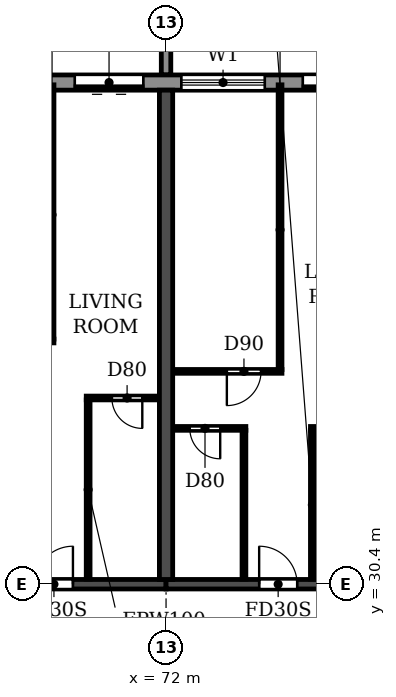
"""IFC4 building model, lengths in metres.
Left out: names, types, materials, properties, quantities, classifications, styles, units other than length and angle.
Written with IfcOpenShell. Run it as: python <this file> out.ifc"""

import sys

from ifc_helpers import new_model, si_unit, direction, frame, frame_2d, origin, place, context, subcontext, project, spatial, polyline, rectangle, outline, extrude, source, transform, mapped, element, fill, save


model = new_model("IFC4")
c1 = context("Model", 3, precision=1e-05, world=origin(), true_north=direction((0.0, 1.0)))
c2 = subcontext(c1, "Body", "Model", "MODEL_VIEW")
j1 = project(units=[si_unit("LENGTHUNIT", "METRE"), si_unit("PLANEANGLEUNIT", "RADIAN")], contexts=[c1])
p1 = place(None, origin())
s1 = spatial("IfcSite", under=j1, at=p1, CompositionType="ELEMENT")
p2 = place(p1, origin())
s2 = spatial("IfcBuilding", under=s1, at=p2, CompositionType="ELEMENT")
p3 = place(p2, frame((0.0, 0.0, 92.7)))
s3 = spatial("IfcBuildingStorey", under=s2, at=p3, CompositionType="ELEMENT", Elevation=92.7)
p4 = place(p3, frame((72.0, 30.525, 0.0), z_axis=(0.0, 0.0, 1.0), x_axis=(0.0, 1.0, 0.0)))
e1 = element("IfcWall", 1, at=p4, inside=s3, PredefinedType="SHEAR", context=c2, shape_type="SweptSolid", body=[
    extrude(rectangle(XDim=12.875, YDim=0.35, at=frame_2d((6.438, 0.0))), origin(), (0.0, 0.0, 1.0), 3.06),
])
p5 = place(p3, frame((66.0, 30.4, 0.0), z_axis=(0.0, 0.0, 1.0), x_axis=(1.0, 0.0, 0.0)))
e2 = element("IfcWall", 2, at=p5, inside=s3, PredefinedType="SHEAR", context=c2, shape_type="SweptSolid", body=[
    extrude(rectangle(XDim=6.0, YDim=0.25, at=frame_2d((3.0, 0.0))), origin(), (0.0, 0.0, 1.0), 2.46),
])
p6 = place(p5, frame((2.55, 0.0, 0.0)))
e3 = element("IfcOpeningElement", 3, at=p6, cuts=e2, PredefinedType="OPENING", context=c2, shape_type="SweptSolid", body=[
    extrude(rectangle(XDim=1.0, YDim=2.1, at=frame_2d((0.5, 1.05))), frame((0.0, 0.135, 0.0), z_axis=(0.0, -1.0, 0.0), x_axis=(1.0, 0.0, 0.0)), (0.0, 0.0, 1.0), 0.27),
])
p7 = place(p3, frame((72.0, 30.4, 0.0), z_axis=(0.0, 0.0, 1.0), x_axis=(1.0, 0.0, 0.0)))
e4 = element("IfcWall", 4, at=p7, inside=s3, PredefinedType="SHEAR", context=c2, shape_type="SweptSolid", body=[
    extrude(rectangle(XDim=6.0, YDim=0.25, at=frame_2d((3.0, 0.0))), origin(), (0.0, 0.0, 1.0), 2.46),
])
p8 = place(p7, frame((2.45, 0.0, 0.0)))
e5 = element("IfcOpeningElement", 5, at=p8, cuts=e4, PredefinedType="OPENING", context=c2, shape_type="SweptSolid", body=[
    extrude(rectangle(XDim=1.0, YDim=2.1, at=frame_2d((0.5, 1.05))), frame((0.0, 0.135, 0.0), z_axis=(0.0, -1.0, 0.0), x_axis=(1.0, 0.0, 0.0)), (0.0, 0.0, 1.0), 0.27),
])
p9 = place(p3, frame((91.317, 43.6, 0.0), z_axis=(0.0, 0.0, 1.0), x_axis=(-1.0, 0.0, 0.0)))
e6 = element("IfcWall", 6, at=p9, inside=s3, PredefinedType="STANDARD", context=c2, shape_type="SweptSolid", body=[
    extrude(rectangle(XDim=80.634, YDim=0.4, at=frame_2d((40.317, 0.0))), origin(), (0.0, 0.0, 1.0), 3.06),
])
p10 = place(p9, frame((76.717, 0.0, 0.9)))
e7 = element("IfcOpeningElement", 7, at=p10, cuts=e6, PredefinedType="OPENING", context=c2, shape_type="SweptSolid", body=[
    extrude(rectangle(XDim=2.2, YDim=1.5, at=frame_2d((1.1, 0.75))), frame((0.0, 0.21, 0.0), z_axis=(0.0, -1.0, 0.0), x_axis=(1.0, 0.0, 0.0)), (0.0, 0.0, 1.0), 0.42),
])
p11 = place(p9, frame((73.917, 0.0, 0.0)))
e8 = element("IfcOpeningElement", 8, at=p11, cuts=e6, PredefinedType="OPENING", context=c2, shape_type="SweptSolid", body=[
    extrude(rectangle(XDim=1.8, YDim=2.4, at=frame_2d((0.9, 1.2))), frame((0.0, 0.21, 0.0), z_axis=(0.0, -1.0, 0.0), x_axis=(1.0, 0.0, 0.0)), (0.0, 0.0, 1.0), 0.42),
])
p12 = place(p9, frame((70.717, 0.0, 0.9)))
e9 = element("IfcOpeningElement", 9, at=p12, cuts=e6, PredefinedType="OPENING", context=c2, shape_type="SweptSolid", body=[
    extrude(rectangle(XDim=2.2, YDim=1.5, at=frame_2d((1.1, 0.75))), frame((0.0, 0.21, 0.0), z_axis=(0.0, -1.0, 0.0), x_axis=(1.0, 0.0, 0.0)), (0.0, 0.0, 1.0), 0.42),
])
p13 = place(p9, frame((67.717, 0.0, 0.9)))
e10 = element("IfcOpeningElement", 10, at=p13, cuts=e6, PredefinedType="OPENING", context=c2, shape_type="SweptSolid", body=[
    extrude(rectangle(XDim=2.2, YDim=1.5, at=frame_2d((1.1, 0.75))), frame((0.0, 0.21, 0.0), z_axis=(0.0, -1.0, 0.0), x_axis=(1.0, 0.0, 0.0)), (0.0, 0.0, 1.0), 0.42),
])
p14 = place(p9, frame((64.717, 0.0, 0.9)))
e11 = element("IfcOpeningElement", 11, at=p14, cuts=e6, PredefinedType="OPENING", context=c2, shape_type="SweptSolid", body=[
    extrude(rectangle(XDim=2.2, YDim=1.5, at=frame_2d((1.1, 0.75))), frame((0.0, 0.21, 0.0), z_axis=(0.0, -1.0, 0.0), x_axis=(1.0, 0.0, 0.0)), (0.0, 0.0, 1.0), 0.42),
])
p15 = place(p9, frame((61.917, 0.0, 0.0)))
e12 = element("IfcOpeningElement", 12, at=p15, cuts=e6, PredefinedType="OPENING", context=c2, shape_type="SweptSolid", body=[
    extrude(rectangle(XDim=1.8, YDim=2.4, at=frame_2d((0.9, 1.2))), frame((0.0, 0.21, 0.0), z_axis=(0.0, -1.0, 0.0), x_axis=(1.0, 0.0, 0.0)), (0.0, 0.0, 1.0), 0.42),
])
p16 = place(p9, frame((58.717, 0.0, 0.9)))
e13 = element("IfcOpeningElement", 13, at=p16, cuts=e6, PredefinedType="OPENING", context=c2, shape_type="SweptSolid", body=[
    extrude(rectangle(XDim=2.2, YDim=1.5, at=frame_2d((1.1, 0.75))), frame((0.0, 0.21, 0.0), z_axis=(0.0, -1.0, 0.0), x_axis=(1.0, 0.0, 0.0)), (0.0, 0.0, 1.0), 0.42),
])
p17 = place(p9, frame((55.717, 0.0, 0.9)))
e14 = element("IfcOpeningElement", 14, at=p17, cuts=e6, PredefinedType="OPENING", context=c2, shape_type="SweptSolid", body=[
    extrude(rectangle(XDim=2.2, YDim=1.5, at=frame_2d((1.1, 0.75))), frame((0.0, 0.21, 0.0), z_axis=(0.0, -1.0, 0.0), x_axis=(1.0, 0.0, 0.0)), (0.0, 0.0, 1.0), 0.42),
])
p18 = place(p9, frame((52.917, 0.0, 0.0)))
e15 = element("IfcOpeningElement", 15, at=p18, cuts=e6, PredefinedType="OPENING", context=c2, shape_type="SweptSolid", body=[
    extrude(rectangle(XDim=1.8, YDim=2.4, at=frame_2d((0.9, 1.2))), frame((0.0, 0.21, 0.0), z_axis=(0.0, -1.0, 0.0), x_axis=(1.0, 0.0, 0.0)), (0.0, 0.0, 1.0), 0.42),
])
p19 = place(p9, frame((49.717, 0.0, 0.9)))
e16 = element("IfcOpeningElement", 16, at=p19, cuts=e6, PredefinedType="OPENING", context=c2, shape_type="SweptSolid", body=[
    extrude(rectangle(XDim=2.2, YDim=1.5, at=frame_2d((1.1, 0.75))), frame((0.0, 0.21, 0.0), z_axis=(0.0, -1.0, 0.0), x_axis=(1.0, 0.0, 0.0)), (0.0, 0.0, 1.0), 0.42),
])
p20 = place(p9, frame((46.717, 0.0, 0.9)))
e17 = element("IfcOpeningElement", 17, at=p20, cuts=e6, PredefinedType="OPENING", context=c2, shape_type="SweptSolid", body=[
    extrude(rectangle(XDim=2.2, YDim=1.5, at=frame_2d((1.1, 0.75))), frame((0.0, 0.21, 0.0), z_axis=(0.0, -1.0, 0.0), x_axis=(1.0, 0.0, 0.0)), (0.0, 0.0, 1.0), 0.42),
])
p21 = place(p9, frame((43.717, 0.0, 0.9)))
e18 = element("IfcOpeningElement", 18, at=p21, cuts=e6, PredefinedType="OPENING", context=c2, shape_type="SweptSolid", body=[
    extrude(rectangle(XDim=2.2, YDim=1.5, at=frame_2d((1.1, 0.75))), frame((0.0, 0.21, 0.0), z_axis=(0.0, -1.0, 0.0), x_axis=(1.0, 0.0, 0.0)), (0.0, 0.0, 1.0), 0.42),
])
p22 = place(p9, frame((40.717, 0.0, 0.9)))
e19 = element("IfcOpeningElement", 19, at=p22, cuts=e6, PredefinedType="OPENING", context=c2, shape_type="SweptSolid", body=[
    extrude(rectangle(XDim=2.2, YDim=1.5, at=frame_2d((1.1, 0.75))), frame((0.0, 0.21, 0.0), z_axis=(0.0, -1.0, 0.0), x_axis=(1.0, 0.0, 0.0)), (0.0, 0.0, 1.0), 0.42),
])
p23 = place(p9, frame((37.917, 0.0, 0.0)))
e20 = element("IfcOpeningElement", 20, at=p23, cuts=e6, PredefinedType="OPENING", context=c2, shape_type="SweptSolid", body=[
    extrude(rectangle(XDim=1.8, YDim=2.4, at=frame_2d((0.9, 1.2))), frame((0.0, 0.21, 0.0), z_axis=(0.0, -1.0, 0.0), x_axis=(1.0, 0.0, 0.0)), (0.0, 0.0, 1.0), 0.42),
])
p24 = place(p9, frame((34.917, 0.0, 0.0)))
e21 = element("IfcOpeningElement", 21, at=p24, cuts=e6, PredefinedType="OPENING", context=c2, shape_type="SweptSolid", body=[
    extrude(rectangle(XDim=1.8, YDim=2.4, at=frame_2d((0.9, 1.2))), frame((0.0, 0.21, 0.0), z_axis=(0.0, -1.0, 0.0), x_axis=(1.0, 0.0, 0.0)), (0.0, 0.0, 1.0), 0.42),
])
p25 = place(p9, frame((31.717, 0.0, 0.9)))
e22 = element("IfcOpeningElement", 22, at=p25, cuts=e6, PredefinedType="OPENING", context=c2, shape_type="SweptSolid", body=[
    extrude(rectangle(XDim=2.2, YDim=1.5, at=frame_2d((1.1, 0.75))), frame((0.0, 0.21, 0.0), z_axis=(0.0, -1.0, 0.0), x_axis=(1.0, 0.0, 0.0)), (0.0, 0.0, 1.0), 0.42),
])
p26 = place(p9, frame((28.717, 0.0, 0.9)))
e23 = element("IfcOpeningElement", 23, at=p26, cuts=e6, PredefinedType="OPENING", context=c2, shape_type="SweptSolid", body=[
    extrude(rectangle(XDim=2.2, YDim=1.5, at=frame_2d((1.1, 0.75))), frame((0.0, 0.21, 0.0), z_axis=(0.0, -1.0, 0.0), x_axis=(1.0, 0.0, 0.0)), (0.0, 0.0, 1.0), 0.42),
])
p27 = place(p9, frame((25.717, 0.0, 0.9)))
e24 = element("IfcOpeningElement", 24, at=p27, cuts=e6, PredefinedType="OPENING", context=c2, shape_type="SweptSolid", body=[
    extrude(rectangle(XDim=2.2, YDim=1.5, at=frame_2d((1.1, 0.75))), frame((0.0, 0.21, 0.0), z_axis=(0.0, -1.0, 0.0), x_axis=(1.0, 0.0, 0.0)), (0.0, 0.0, 1.0), 0.42),
])
p28 = place(p9, frame((22.717, 0.0, 0.9)))
e25 = element("IfcOpeningElement", 25, at=p28, cuts=e6, PredefinedType="OPENING", context=c2, shape_type="SweptSolid", body=[
    extrude(rectangle(XDim=2.2, YDim=1.5, at=frame_2d((1.1, 0.75))), frame((0.0, 0.21, 0.0), z_axis=(0.0, -1.0, 0.0), x_axis=(1.0, 0.0, 0.0)), (0.0, 0.0, 1.0), 0.42),
])
p29 = place(p9, frame((19.917, 0.0, 0.0)))
e26 = element("IfcOpeningElement", 26, at=p29, cuts=e6, PredefinedType="OPENING", context=c2, shape_type="SweptSolid", body=[
    extrude(rectangle(XDim=1.8, YDim=2.4, at=frame_2d((0.9, 1.2))), frame((0.0, 0.21, 0.0), z_axis=(0.0, -1.0, 0.0), x_axis=(1.0, 0.0, 0.0)), (0.0, 0.0, 1.0), 0.42),
])
p30 = place(p9, frame((16.717, 0.0, 0.9)))
e27 = element("IfcOpeningElement", 27, at=p30, cuts=e6, PredefinedType="OPENING", context=c2, shape_type="SweptSolid", body=[
    extrude(rectangle(XDim=2.2, YDim=1.5, at=frame_2d((1.1, 0.75))), frame((0.0, 0.21, 0.0), z_axis=(0.0, -1.0, 0.0), x_axis=(1.0, 0.0, 0.0)), (0.0, 0.0, 1.0), 0.42),
])
p31 = place(p9, frame((13.917, 0.0, 0.0)))
e28 = element("IfcOpeningElement", 28, at=p31, cuts=e6, PredefinedType="OPENING", context=c2, shape_type="SweptSolid", body=[
    extrude(rectangle(XDim=1.8, YDim=2.4, at=frame_2d((0.9, 1.2))), frame((0.0, 0.21, 0.0), z_axis=(0.0, -1.0, 0.0), x_axis=(1.0, 0.0, 0.0)), (0.0, 0.0, 1.0), 0.42),
])
p32 = place(p9, frame((10.717, 0.0, 0.9)))
e29 = element("IfcOpeningElement", 29, at=p32, cuts=e6, PredefinedType="OPENING", context=c2, shape_type="SweptSolid", body=[
    extrude(rectangle(XDim=2.2, YDim=1.5, at=frame_2d((1.1, 0.75))), frame((0.0, 0.21, 0.0), z_axis=(0.0, -1.0, 0.0), x_axis=(1.0, 0.0, 0.0)), (0.0, 0.0, 1.0), 0.42),
])
p33 = place(p9, frame((7.917, 0.0, 0.0)))
e30 = element("IfcOpeningElement", 30, at=p33, cuts=e6, PredefinedType="OPENING", context=c2, shape_type="SweptSolid", body=[
    extrude(rectangle(XDim=1.8, YDim=2.4, at=frame_2d((0.9, 1.2))), frame((0.0, 0.21, 0.0), z_axis=(0.0, -1.0, 0.0), x_axis=(1.0, 0.0, 0.0)), (0.0, 0.0, 1.0), 0.42),
])
p34 = place(p9, frame((4.717, 0.0, 0.9)))
e31 = element("IfcOpeningElement", 31, at=p34, cuts=e6, PredefinedType="OPENING", context=c2, shape_type="SweptSolid", body=[
    extrude(rectangle(XDim=2.2, YDim=1.5, at=frame_2d((1.1, 0.75))), frame((0.0, 0.21, 0.0), z_axis=(0.0, -1.0, 0.0), x_axis=(1.0, 0.0, 0.0)), (0.0, 0.0, 1.0), 0.42),
])
p35 = place(p9, frame((1.917, 0.0, 0.0)))
e32 = element("IfcOpeningElement", 32, at=p35, cuts=e6, PredefinedType="OPENING", context=c2, shape_type="SweptSolid", body=[
    extrude(rectangle(XDim=1.8, YDim=2.4, at=frame_2d((0.9, 1.2))), frame((0.0, 0.21, 0.0), z_axis=(0.0, -1.0, 0.0), x_axis=(1.0, 0.0, 0.0)), (0.0, 0.0, 1.0), 0.42),
])
m1 = source(origin(), c2, "Body", "SweptSolid", [
    extrude(outline(polyline([(0.0, 0.0), (0.25, 0.0), (0.25, 3.1), (0.0, 3.1), (0.0, 0.0)])), origin(), (0.0, 0.0, 1.0), 3.1),
])
p36 = place(p3, frame((71.875, 43.8, 0.0)))
e33 = element("IfcWall", 33, at=p36, inside=s3, PredefinedType="STANDARD", context=c2, shape_type="MappedRepresentation", body=[
    mapped(m1, transform((0.0, 0.0, 0.0))),
])
p37 = place(p3, frame((72.185, 34.5, 0.0), z_axis=(0.0, 0.0, 1.0), x_axis=(1.0, 0.0, 0.0)))
e34 = element("IfcWall", 34, at=p37, inside=s3, PredefinedType="PARTITIONING", context=c2, shape_type="SweptSolid", body=[
    extrude(rectangle(XDim=1.915, YDim=0.1, at=frame_2d((0.958, 0.0))), origin(), (0.0, 0.0, 1.0), 3.06),
])
p38 = place(p37, frame((0.44, 0.0, 0.0)))
e35 = element("IfcOpeningElement", 35, at=p38, cuts=e34, PredefinedType="OPENING", context=c2, shape_type="SweptSolid", body=[
    extrude(rectangle(XDim=0.8, YDim=2.1, at=frame_2d((0.4, 1.05))), frame((0.0, 0.06, 0.0), z_axis=(0.0, -1.0, 0.0), x_axis=(1.0, 0.0, 0.0)), (0.0, 0.0, 1.0), 0.12),
])
p39 = place(p3, frame((75.8, 34.5, 0.0), z_axis=(0.0, 0.0, 1.0), x_axis=(1.0, 0.0, 0.0)))
e36 = element("IfcWall", 36, at=p39, inside=s3, PredefinedType="PARTITIONING", context=c2, shape_type="SweptSolid", body=[
    extrude(rectangle(XDim=2.015, YDim=0.1, at=frame_2d((1.007, 0.0))), origin(), (0.0, 0.0, 1.0), 3.06),
])
p40 = place(p39, frame((0.675, 0.0, 0.0)))
e37 = element("IfcOpeningElement", 37, at=p40, cuts=e36, PredefinedType="OPENING", context=c2, shape_type="SweptSolid", body=[
    extrude(rectangle(XDim=0.9, YDim=2.1, at=frame_2d((0.45, 1.05))), frame((0.0, 0.06, 0.0), z_axis=(0.0, -1.0, 0.0), x_axis=(1.0, 0.0, 0.0)), (0.0, 0.0, 1.0), 0.12),
])
p41 = place(p3, frame((69.9, 35.3, 0.0), z_axis=(0.0, 0.0, 1.0), x_axis=(1.0, 0.0, 0.0)))
e38 = element("IfcWall", 38, at=p41, inside=s3, PredefinedType="PARTITIONING", context=c2, shape_type="SweptSolid", body=[
    extrude(rectangle(XDim=1.915, YDim=0.1, at=frame_2d((0.958, 0.0))), origin(), (0.0, 0.0, 1.0), 3.06),
])
p42 = place(p41, frame((0.675, 0.0, 0.0)))
e39 = element("IfcOpeningElement", 39, at=p42, cuts=e38, PredefinedType="OPENING", context=c2, shape_type="SweptSolid", body=[
    extrude(rectangle(XDim=0.8, YDim=2.1, at=frame_2d((0.4, 1.05))), frame((0.0, 0.06, 0.0), z_axis=(0.0, -1.0, 0.0), x_axis=(1.0, 0.0, 0.0)), (0.0, 0.0, 1.0), 0.12),
])
p43 = place(p3, frame((72.185, 36.0, 0.0), z_axis=(0.0, 0.0, 1.0), x_axis=(1.0, 0.0, 0.0)))
e40 = element("IfcWall", 40, at=p43, inside=s3, PredefinedType="PARTITIONING", context=c2, shape_type="SweptSolid", body=[
    extrude(rectangle(XDim=2.865, YDim=0.1, at=frame_2d((1.433, 0.0))), origin(), (0.0, 0.0, 1.0), 3.06),
])
p44 = place(p43, frame((1.415, 0.0, 0.0)))
e41 = element("IfcOpeningElement", 41, at=p44, cuts=e40, PredefinedType="OPENING", context=c2, shape_type="SweptSolid", body=[
    extrude(rectangle(XDim=0.9, YDim=2.1, at=frame_2d((0.45, 1.05))), frame((0.0, 0.06, 0.0), z_axis=(0.0, -1.0, 0.0), x_axis=(1.0, 0.0, 0.0)), (0.0, 0.0, 1.0), 0.12),
])
p45 = place(p3, frame((66.185, 36.8, 0.0), z_axis=(0.0, 0.0, 1.0), x_axis=(1.0, 0.0, 0.0)))
e42 = element("IfcWall", 42, at=p45, inside=s3, PredefinedType="PARTITIONING", context=c2, shape_type="SweptSolid", body=[
    extrude(rectangle(XDim=2.865, YDim=0.1, at=frame_2d((1.433, 0.0))), origin(), (0.0, 0.0, 1.0), 3.06),
])
p46 = place(p45, frame((0.315, 0.0, 0.0)))
e43 = element("IfcOpeningElement", 43, at=p46, cuts=e42, PredefinedType="OPENING", context=c2, shape_type="SweptSolid", body=[
    extrude(rectangle(XDim=0.9, YDim=2.1, at=frame_2d((0.45, 1.05))), frame((0.0, 0.06, 0.0), z_axis=(0.0, -1.0, 0.0), x_axis=(1.0, 0.0, 0.0)), (0.0, 0.0, 1.0), 0.12),
])
p47 = place(p3, frame((69.0, 36.85, 0.0), z_axis=(0.0, 0.0, 1.0), x_axis=(0.0, 1.0, 0.0)))
e44 = element("IfcWall", 44, at=p47, inside=s3, PredefinedType="PARTITIONING", context=c2, shape_type="SweptSolid", body=[
    extrude(rectangle(XDim=6.69, YDim=0.1, at=frame_2d((3.345, 0.0))), origin(), (0.0, 0.0, 1.0), 3.06),
])
p48 = place(p3, frame((69.95, 30.535, 0.0), z_axis=(0.0, 0.0, 1.0), x_axis=(0.0, 1.0, 0.0)))
e45 = element("IfcWall", 45, at=p48, inside=s3, PredefinedType="PARTITIONING", context=c2, shape_type="SweptSolid", body=[
    extrude(rectangle(XDim=4.715, YDim=0.1, at=frame_2d((2.357, 0.0))), origin(), (0.0, 0.0, 1.0), 3.06),
])
p49 = place(p3, frame((74.05, 30.535, 0.0), z_axis=(0.0, 0.0, 1.0), x_axis=(0.0, 1.0, 0.0)))
e46 = element("IfcWall", 46, at=p49, inside=s3, PredefinedType="PARTITIONING", context=c2, shape_type="SweptSolid", body=[
    extrude(rectangle(XDim=3.915, YDim=0.1, at=frame_2d((1.958, 0.0))), origin(), (0.0, 0.0, 1.0), 3.06),
])
p50 = place(p3, frame((75.0, 36.05, 0.0), z_axis=(0.0, 0.0, 1.0), x_axis=(0.0, 1.0, 0.0)))
e47 = element("IfcWall", 47, at=p50, inside=s3, PredefinedType="PARTITIONING", context=c2, shape_type="SweptSolid", body=[
    extrude(rectangle(XDim=7.49, YDim=0.1, at=frame_2d((3.745, 0.0))), origin(), (0.0, 0.0, 1.0), 3.06),
])
p51 = place(p3, frame((75.85, 30.535, 0.0), z_axis=(0.0, 0.0, 1.0), x_axis=(0.0, 1.0, 0.0)))
e48 = element("IfcWall", 48, at=p51, inside=s3, PredefinedType="PARTITIONING", context=c2, shape_type="SweptSolid", body=[
    extrude(rectangle(XDim=3.915, YDim=0.1, at=frame_2d((1.958, 0.0))), origin(), (0.0, 0.0, 1.0), 3.06),
])
p52 = place(p29, origin())
e49 = element("IfcDoor", 49, at=p52, inside=s3, OperationType="DOUBLE_DOOR_SLIDING", PredefinedType="DOOR", context=c2, shape_type="SweptSolid", body=[
    extrude(rectangle(XDim=1.8, YDim=2.4, at=frame_2d((0.9, 1.2))), frame((0.0, 0.025, 0.0), z_axis=(0.0, -1.0, 0.0), x_axis=(1.0, 0.0, 0.0)), (0.0, 0.0, 1.0), 0.05),
])
fill(e26, e49)
p53 = place(p30, origin())
e50 = element("IfcWindow", 50, at=p53, inside=s3, PartitioningType="DOUBLE_PANEL_HORIZONTAL", PredefinedType="WINDOW", context=c2, shape_type="SweptSolid", body=[
    extrude(rectangle(XDim=2.2, YDim=1.5, at=frame_2d((1.1, 0.75))), frame((0.0, 0.03, 0.0), z_axis=(0.0, -1.0, 0.0), x_axis=(1.0, 0.0, 0.0)), (0.0, 0.0, 1.0), 0.06),
])
fill(e27, e50)
p54 = place(p31, origin())
e51 = element("IfcDoor", 51, at=p54, inside=s3, OperationType="DOUBLE_DOOR_SLIDING", PredefinedType="DOOR", context=c2, shape_type="SweptSolid", body=[
    extrude(rectangle(XDim=1.8, YDim=2.4, at=frame_2d((0.9, 1.2))), frame((0.0, 0.025, 0.0), z_axis=(0.0, -1.0, 0.0), x_axis=(1.0, 0.0, 0.0)), (0.0, 0.0, 1.0), 0.05),
])
fill(e28, e51)
p55 = place(p6, origin())
e52 = element("IfcDoor", 52, at=p55, inside=s3, OperationType="SINGLE_SWING_RIGHT", PredefinedType="DOOR", context=c2, shape_type="SweptSolid", body=[
    extrude(rectangle(XDim=1.0, YDim=2.1, at=frame_2d((0.5, 1.05))), frame((0.0, 0.025, 0.0), z_axis=(0.0, -1.0, 0.0), x_axis=(1.0, 0.0, 0.0)), (0.0, 0.0, 1.0), 0.05),
])
fill(e3, e52)
p56 = place(p42, frame((0.8, 0.0, 0.0), z_axis=(0.0, 0.0, 1.0), x_axis=(-1.0, 0.0, 0.0)))
e53 = element("IfcDoor", 53, at=p56, inside=s3, OperationType="SINGLE_SWING_LEFT", PredefinedType="DOOR", context=c2, shape_type="SweptSolid", body=[
    extrude(rectangle(XDim=0.8, YDim=2.1, at=frame_2d((0.4, 1.05))), frame((0.0, 0.025, 0.0), z_axis=(0.0, -1.0, 0.0), x_axis=(1.0, 0.0, 0.0)), (0.0, 0.0, 1.0), 0.05),
])
fill(e39, e53)
p57 = place(p38, frame((0.8, 0.0, 0.0), z_axis=(0.0, 0.0, 1.0), x_axis=(-1.0, 0.0, 0.0)))
e54 = element("IfcDoor", 54, at=p57, inside=s3, OperationType="SINGLE_SWING_LEFT", PredefinedType="DOOR", context=c2, shape_type="SweptSolid", body=[
    extrude(rectangle(XDim=0.8, YDim=2.1, at=frame_2d((0.4, 1.05))), frame((0.0, 0.025, 0.0), z_axis=(0.0, -1.0, 0.0), x_axis=(1.0, 0.0, 0.0)), (0.0, 0.0, 1.0), 0.05),
])
fill(e35, e54)
p58 = place(p44, frame((0.9, 0.0, 0.0), z_axis=(0.0, 0.0, 1.0), x_axis=(-1.0, 0.0, 0.0)))
e55 = element("IfcDoor", 55, at=p58, inside=s3, OperationType="SINGLE_SWING_RIGHT", PredefinedType="DOOR", context=c2, shape_type="SweptSolid", body=[
    extrude(rectangle(XDim=0.9, YDim=2.1, at=frame_2d((0.45, 1.05))), frame((0.0, 0.025, 0.0), z_axis=(0.0, -1.0, 0.0), x_axis=(1.0, 0.0, 0.0)), (0.0, 0.0, 1.0), 0.05),
])
fill(e41, e55)
p59 = place(p8, origin())
e56 = element("IfcDoor", 56, at=p59, inside=s3, OperationType="SINGLE_SWING_LEFT", PredefinedType="DOOR", context=c2, shape_type="SweptSolid", body=[
    extrude(rectangle(XDim=1.0, YDim=2.1, at=frame_2d((0.5, 1.05))), frame((0.0, 0.025, 0.0), z_axis=(0.0, -1.0, 0.0), x_axis=(1.0, 0.0, 0.0)), (0.0, 0.0, 1.0), 0.05),
])
fill(e5, e56)
save(model, sys.argv[1])
